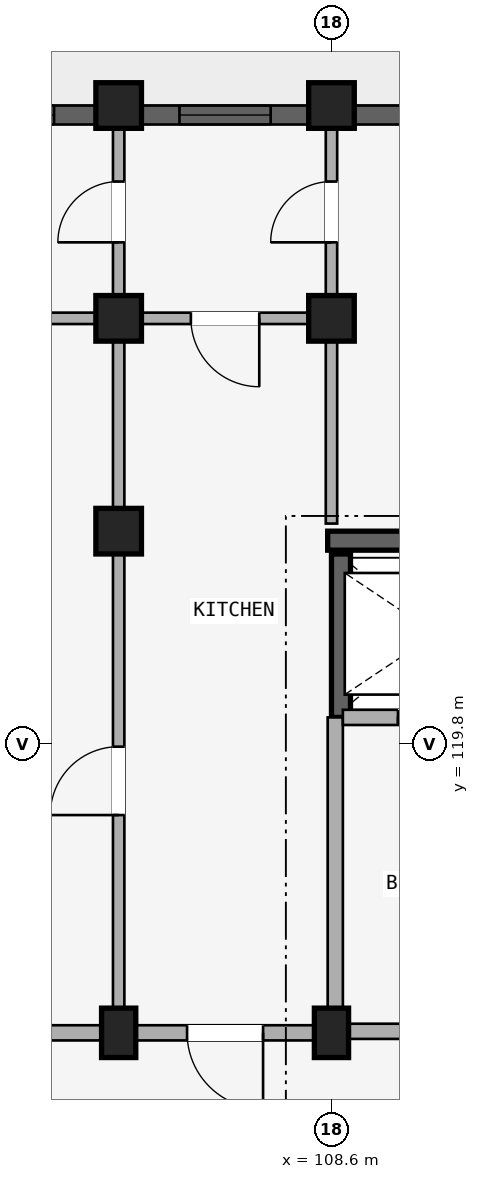
"""IFC4 building model, lengths in metres.
Left out: names, types, materials, properties, quantities, classifications, styles, units other than length and angle.
Written with IfcOpenShell. Run it as: python <this file> out.ifc"""

import sys

from ifc_helpers import new_model, si_unit, direction, frame, frame_2d, origin, origin_2d, place, context, subcontext, project, spatial, rectangle, extrude, element, fill, save


model = new_model("IFC4")
c1 = context("Model", 3, precision=1e-05, world=origin(), true_north=direction((0.0, 1.0)))
c2 = subcontext(c1, "Body", "Model", "MODEL_VIEW")
j1 = project(units=[si_unit("LENGTHUNIT", "METRE"), si_unit("PLANEANGLEUNIT", "RADIAN")], contexts=[c1])
p1 = place(None, origin())
s1 = spatial("IfcSite", under=j1, at=p1, CompositionType="ELEMENT")
p2 = place(p1, origin())
s2 = spatial("IfcBuilding", under=s1, at=p2, CompositionType="ELEMENT")
p3 = place(p2, frame((0.0, 0.0, 33.9)))
s3 = spatial("IfcBuildingStorey", under=s2, at=p3, CompositionType="ELEMENT", Elevation=33.9)
p4 = place(p3, frame((111.35, 122.475, 0.0), z_axis=(0.0, 0.0, 1.0), x_axis=(-1.0, 0.0, 0.0)))
e1 = element("IfcWall", 1, at=p4, inside=s3, PredefinedType="SHEAR", context=c2, shape_type="SweptSolid", body=[
    extrude(rectangle(XDim=2.8, YDim=0.25, at=frame_2d((1.4, 0.0))), origin(), (0.0, 0.0, 1.0), 2.93),
])
p5 = place(p3, frame((108.725, 120.15, 0.0), z_axis=(0.0, 0.0, 1.0), x_axis=(0.0, 1.0, 0.0)))
e2 = element("IfcWall", 2, at=p5, inside=s3, PredefinedType="SHEAR", context=c2, shape_type="SweptSolid", body=[
    extrude(rectangle(XDim=2.15, YDim=0.25, at=frame_2d((1.075, 0.0))), origin(), (0.0, 0.0, 1.0), 2.93),
])
p6 = place(p3, frame((108.6, 116.0, 0.0), z_axis=(0.0, 0.0, 1.0), x_axis=(1.0, 0.0, 0.0)))
e3 = element("IfcColumn", 3, at=p6, inside=s3, PredefinedType="COLUMN", context=c2, shape_type="SweptSolid", body=[
    extrude(rectangle(XDim=0.45, YDim=0.65, at=origin_2d()), origin(), (0.0, 0.0, 1.0), 2.93),
])
p7 = place(p3, frame((108.6, 125.4, 0.0), z_axis=(0.0, 0.0, 1.0), x_axis=(1.0, 0.0, 0.0)))
e4 = element("IfcColumn", 4, at=p7, inside=s3, PredefinedType="COLUMN", context=c2, shape_type="SweptSolid", body=[
    extrude(rectangle(XDim=0.6, YDim=0.6, at=origin_2d()), origin(), (0.0, 0.0, 1.0), 2.93),
])
p8 = place(p3, frame((108.6, 128.2, 0.0), z_axis=(0.0, 0.0, 1.0), x_axis=(1.0, 0.0, 0.0)))
e5 = element("IfcColumn", 5, at=p8, inside=s3, PredefinedType="COLUMN", context=c2, shape_type="SweptSolid", body=[
    extrude(rectangle(XDim=0.6, YDim=0.6, at=origin_2d()), origin(), (0.0, 0.0, 1.0), 2.97),
])
p9 = place(p3, frame((105.8, 116.0, 0.0), z_axis=(0.0, 0.0, 1.0), x_axis=(1.0, 0.0, 0.0)))
e6 = element("IfcColumn", 6, at=p9, inside=s3, PredefinedType="COLUMN", context=c2, shape_type="SweptSolid", body=[
    extrude(rectangle(XDim=0.45, YDim=0.65, at=origin_2d()), origin(), (0.0, 0.0, 1.0), 2.93),
])
for number, where, z_axis, x_axis in (
    (7, (105.8, 122.6, 0.0), (0.0, 0.0, 1.0), (1.0, 0.0, 0.0)),
    (8, (105.8, 125.4, 0.0), (0.0, 0.0, 1.0), (1.0, 0.0, 0.0)),
):
    element("IfcColumn", number, at=place(p3, frame(where, z_axis=z_axis, x_axis=x_axis)), inside=s3, PredefinedType="COLUMN", context=c2, shape_type="SweptSolid", body=[
        extrude(rectangle(XDim=0.6, YDim=0.6, at=origin_2d()), origin(), (0.0, 0.0, 1.0), 2.93),
    ])
p10 = place(p3, frame((105.8, 128.2, 0.0), z_axis=(0.0, 0.0, 1.0), x_axis=(1.0, 0.0, 0.0)))
e9 = element("IfcColumn", 9, at=p10, inside=s3, PredefinedType="COLUMN", context=c2, shape_type="SweptSolid", body=[
    extrude(rectangle(XDim=0.6, YDim=0.6, at=origin_2d()), origin(), (0.0, 0.0, 1.0), 2.97),
])
p11 = place(p3, frame((114.3, 116.02, 0.0), z_axis=(0.0, 0.0, 1.0), x_axis=(-1.0, 0.0, 0.0)))
e10 = element("IfcWall", 10, at=p11, inside=s3, PredefinedType="STANDARD", context=c2, shape_type="SweptSolid", body=[
    extrude(rectangle(XDim=5.65, YDim=0.2, at=frame_2d((2.825, 0.0))), origin(), (0.0, 0.0, 1.0), 2.372),
])
p12 = place(p11, frame((1.923, 0.0, 0.0)))
e11 = element("IfcOpeningElement", 11, at=p12, cuts=e10, PredefinedType="OPENING", context=c2, shape_type="SweptSolid", body=[
    extrude(rectangle(XDim=1.24, YDim=2.15, at=frame_2d((0.62, 1.075))), frame((0.0, 0.11, 0.0), z_axis=(0.0, -1.0, 0.0), x_axis=(1.0, 0.0, 0.0)), (0.0, 0.0, 1.0), 0.22),
])
p13 = place(p3, frame((108.65, 116.02, 0.0), z_axis=(0.0, 0.0, 1.0), x_axis=(0.0, 1.0, 0.0)))
e12 = element("IfcWall", 12, at=p13, inside=s3, PredefinedType="STANDARD", context=c2, shape_type="SweptSolid", body=[
    extrude(rectangle(XDim=4.13, YDim=0.2, at=frame_2d((2.065, 0.0))), origin(), (0.0, 0.0, 1.0), 2.372),
])
p14 = place(p3, frame((111.3, 120.15, 0.0), z_axis=(0.0, 0.0, 1.0), x_axis=(-1.0, 0.0, 0.0)))
e13 = element("IfcWall", 13, at=p14, inside=s3, PredefinedType="STANDARD", context=c2, shape_type="SweptSolid", body=[
    extrude(rectangle(XDim=2.55, YDim=0.2, at=frame_2d((1.275, 0.0))), origin(), (0.0, 0.0, 1.0), 2.372),
])
p15 = place(p14, frame((0.725, 0.0, 0.0)))
e14 = element("IfcOpeningElement", 14, at=p15, cuts=e13, PredefinedType="OPENING", context=c2, shape_type="SweptSolid", body=[
    extrude(rectangle(XDim=1.1, YDim=2.15, at=frame_2d((0.55, 1.075))), frame((0.0, 0.11, 0.0), z_axis=(0.0, -1.0, 0.0), x_axis=(1.0, 0.0, 0.0)), (0.0, 0.0, 1.0), 0.22),
])
p16 = place(p3, frame((108.6, 116.0, 0.0), z_axis=(0.0, 0.0, 1.0), x_axis=(-1.0, 0.0, 0.0)))
e15 = element("IfcWall", 15, at=p16, inside=s3, PredefinedType="STANDARD", context=c2, shape_type="SweptSolid", body=[
    extrude(rectangle(XDim=2.8, YDim=0.2, at=frame_2d((1.4, 0.0))), origin(), (0.0, 0.0, 1.0), 2.372),
])
p17 = place(p16, frame((0.9, 0.0, 0.0)))
e16 = element("IfcOpeningElement", 16, at=p17, cuts=e15, PredefinedType="OPENING", context=c2, shape_type="SweptSolid", body=[
    extrude(rectangle(XDim=1.0, YDim=2.15, at=frame_2d((0.5, 1.075))), frame((0.0, 0.11, 0.0), z_axis=(0.0, -1.0, 0.0), x_axis=(1.0, 0.0, 0.0)), (0.0, 0.0, 1.0), 0.22),
])
p18 = place(p3, frame((108.52, 125.4, 0.0), z_axis=(0.0, 0.0, 1.0), x_axis=(-1.0, 0.0, 0.0)))
e17 = element("IfcWall", 17, at=p18, inside=s3, PredefinedType="PLUMBINGWALL", context=c2, shape_type="SweptSolid", body=[
    extrude(rectangle(XDim=2.64, YDim=0.15, at=frame_2d((1.32, 0.0))), origin(), (0.0, 0.0, 1.0), 2.372),
])
p19 = place(p18, frame((0.87, 0.0, 0.0)))
e18 = element("IfcOpeningElement", 18, at=p19, cuts=e17, PredefinedType="OPENING", context=c2, shape_type="SweptSolid", body=[
    extrude(rectangle(XDim=0.9, YDim=2.1, at=frame_2d((0.45, 1.05))), frame((0.0, 0.085, 0.0), z_axis=(0.0, -1.0, 0.0), x_axis=(1.0, 0.0, 0.0)), (0.0, 0.0, 1.0), 0.17),
])
p20 = place(p3, frame((105.8, 116.0, 0.0), z_axis=(0.0, 0.0, 1.0), x_axis=(-1.0, 0.0, 0.0)))
e19 = element("IfcWall", 19, at=p20, inside=s3, PredefinedType="STANDARD", context=c2, shape_type="SweptSolid", body=[
    extrude(rectangle(XDim=2.8, YDim=0.2, at=frame_2d((1.4, 0.0))), origin(), (0.0, 0.0, 1.0), 2.372),
])
p21 = place(p3, frame((105.72, 125.4, 0.0), z_axis=(0.0, 0.0, 1.0), x_axis=(-1.0, 0.0, 0.0)))
e20 = element("IfcWall", 20, at=p21, inside=s3, PredefinedType="PLUMBINGWALL", context=c2, shape_type="SweptSolid", body=[
    extrude(rectangle(XDim=2.64, YDim=0.15, at=frame_2d((1.32, 0.0))), origin(), (0.0, 0.0, 1.0), 2.372),
])
p22 = place(p21, frame((0.92, 0.0, 0.0)))
e21 = element("IfcOpeningElement", 21, at=p22, cuts=e20, PredefinedType="OPENING", context=c2, shape_type="SweptSolid", body=[
    extrude(rectangle(XDim=0.8, YDim=2.1, at=frame_2d((0.4, 1.05))), frame((0.0, 0.085, 0.0), z_axis=(0.0, -1.0, 0.0), x_axis=(1.0, 0.0, 0.0)), (0.0, 0.0, 1.0), 0.17),
])
p23 = place(p3, frame((108.6, 122.7, 0.0), z_axis=(0.0, 0.0, 1.0), x_axis=(0.0, 1.0, 0.0)))
e22 = element("IfcWall", 22, at=p23, inside=s3, PredefinedType="PARTITIONING", context=c2, shape_type="SweptSolid", body=[
    extrude(rectangle(XDim=5.22, YDim=0.15, at=frame_2d((2.61, 0.0))), origin(), (0.0, 0.0, 1.0), 2.372),
])
p24 = place(p23, frame((3.7, 0.0, 0.0)))
e23 = element("IfcOpeningElement", 23, at=p24, cuts=e22, PredefinedType="OPENING", context=c2, shape_type="SweptSolid", body=[
    extrude(rectangle(XDim=0.8, YDim=2.1, at=frame_2d((0.4, 1.05))), frame((0.0, 0.085, 0.0), z_axis=(0.0, -1.0, 0.0), x_axis=(1.0, 0.0, 0.0)), (0.0, 0.0, 1.0), 0.17),
])
p25 = place(p3, frame((105.8, 116.05, 0.0), z_axis=(0.0, 0.0, 1.0), x_axis=(0.0, 1.0, 0.0)))
e24 = element("IfcWall", 24, at=p25, inside=s3, PredefinedType="PARTITIONING", context=c2, shape_type="SweptSolid", body=[
    extrude(rectangle(XDim=6.53, YDim=0.15, at=frame_2d((3.265, 0.0))), origin(), (0.0, 0.0, 1.0), 2.372),
])
p26 = place(p25, frame((2.815, 0.0, 0.0)))
e25 = element("IfcOpeningElement", 25, at=p26, cuts=e24, PredefinedType="OPENING", context=c2, shape_type="SweptSolid", body=[
    extrude(rectangle(XDim=0.9, YDim=2.1, at=frame_2d((0.45, 1.05))), frame((0.0, 0.085, 0.0), z_axis=(0.0, -1.0, 0.0), x_axis=(1.0, 0.0, 0.0)), (0.0, 0.0, 1.0), 0.17),
])
p27 = place(p3, frame((105.8, 122.7, 0.0), z_axis=(0.0, 0.0, 1.0), x_axis=(0.0, 1.0, 0.0)))
e26 = element("IfcWall", 26, at=p27, inside=s3, PredefinedType="PARTITIONING", context=c2, shape_type="SweptSolid", body=[
    extrude(rectangle(XDim=5.22, YDim=0.15, at=frame_2d((2.61, 0.0))), origin(), (0.0, 0.0, 1.0), 2.372),
])
p28 = place(p27, frame((3.7, 0.0, 0.0)))
e27 = element("IfcOpeningElement", 27, at=p28, cuts=e26, PredefinedType="OPENING", context=c2, shape_type="SweptSolid", body=[
    extrude(rectangle(XDim=0.8, YDim=2.1, at=frame_2d((0.4, 1.05))), frame((0.0, 0.085, 0.0), z_axis=(0.0, -1.0, 0.0), x_axis=(1.0, 0.0, 0.0)), (0.0, 0.0, 1.0), 0.17),
])
p29 = place(p3, frame((113.896, 128.075, 0.0), z_axis=(0.0, 0.0, 1.0), x_axis=(-1.0, 0.0, 0.0)))
e28 = element("IfcWall", 28, at=p29, inside=s3, PredefinedType="STANDARD", context=c2, shape_type="SweptSolid", body=[
    extrude(rectangle(XDim=4.993, YDim=0.25, at=frame_2d((2.497, 0.0))), origin(), (0.0, 0.0, 1.0), 2.48),
])
p30 = place(p29, frame((1.822, 0.0, 0.68)))
e29 = element("IfcOpeningElement", 29, at=p30, cuts=e28, PredefinedType="OPENING", context=c2, shape_type="SweptSolid", body=[
    extrude(rectangle(XDim=1.35, YDim=1.6, at=frame_2d((0.675, 0.8))), frame((0.0, 0.135, 0.0), z_axis=(0.0, -1.0, 0.0), x_axis=(1.0, 0.0, 0.0)), (0.0, 0.0, 1.0), 0.27),
])
p31 = place(p3, frame((108.296, 128.075, 0.0), z_axis=(0.0, 0.0, 1.0), x_axis=(-1.0, 0.0, 0.0)))
e30 = element("IfcWall", 30, at=p31, inside=s3, PredefinedType="STANDARD", context=c2, shape_type="SweptSolid", body=[
    extrude(rectangle(XDim=2.193, YDim=0.25, at=frame_2d((1.096, 0.0))), origin(), (0.0, 0.0, 1.0), 2.48),
])
p32 = place(p31, frame((0.497, 0.0, 0.78)))
e31 = element("IfcOpeningElement", 31, at=p32, cuts=e30, PredefinedType="OPENING", context=c2, shape_type="SweptSolid", body=[
    extrude(rectangle(XDim=1.2, YDim=1.5, at=frame_2d((0.6, 0.75))), frame((0.0, 0.135, 0.0), z_axis=(0.0, -1.0, 0.0), x_axis=(1.0, 0.0, 0.0)), (0.0, 0.0, 1.0), 0.27),
])
p33 = place(p3, frame((105.497, 128.075, 0.0), z_axis=(0.0, 0.0, 1.0), x_axis=(-1.0, 0.0, 0.0)))
e32 = element("IfcWall", 32, at=p33, inside=s3, PredefinedType="STANDARD", context=c2, shape_type="SweptSolid", body=[
    extrude(rectangle(XDim=2.193, YDim=0.25, at=frame_2d((1.097, 0.0))), origin(), (0.0, 0.0, 1.0), 2.48),
])
p34 = place(p33, frame((0.546, 0.0, 0.83)))
e33 = element("IfcOpeningElement", 33, at=p34, cuts=e32, PredefinedType="OPENING", context=c2, shape_type="SweptSolid", body=[
    extrude(rectangle(XDim=1.1, YDim=1.45, at=frame_2d((0.55, 0.725))), frame((0.0, 0.135, 0.0), z_axis=(0.0, -1.0, 0.0), x_axis=(1.0, 0.0, 0.0)), (0.0, 0.0, 1.0), 0.27),
])
p35 = place(p32, origin())
e34 = element("IfcWindow", 34, at=p35, inside=s3, PartitioningType="SINGLE_PANEL", PredefinedType="WINDOW", context=c2, shape_type="SweptSolid", body=[
    extrude(rectangle(XDim=1.2, YDim=1.5, at=frame_2d((0.6, 0.75))), frame((0.0, 0.03, 0.0), z_axis=(0.0, -1.0, 0.0), x_axis=(1.0, 0.0, 0.0)), (0.0, 0.0, 1.0), 0.06),
])
fill(e31, e34)
p36 = place(p34, origin())
e35 = element("IfcWindow", 35, at=p36, inside=s3, PartitioningType="SINGLE_PANEL", PredefinedType="WINDOW", context=c2, shape_type="SweptSolid", body=[
    extrude(rectangle(XDim=1.1, YDim=1.45, at=frame_2d((0.55, 0.725))), frame((0.0, 0.03, 0.0), z_axis=(0.0, -1.0, 0.0), x_axis=(1.0, 0.0, 0.0)), (0.0, 0.0, 1.0), 0.06),
])
fill(e33, e35)
p37 = place(p15, origin())
e36 = element("IfcDoor", 36, at=p37, inside=s3, OperationType="SLIDING_TO_LEFT", PredefinedType="DOOR", context=c2, shape_type="SweptSolid", body=[
    extrude(rectangle(XDim=1.1, YDim=2.15, at=frame_2d((0.55, 1.075))), frame((0.0, 0.025, 0.0), z_axis=(0.0, -1.0, 0.0), x_axis=(1.0, 0.0, 0.0)), (0.0, 0.0, 1.0), 0.05),
])
fill(e14, e36)
p38 = place(p19, frame((0.9, 0.0, 0.0), z_axis=(0.0, 0.0, 1.0), x_axis=(-1.0, 0.0, 0.0)))
e37 = element("IfcDoor", 37, at=p38, inside=s3, OperationType="SINGLE_SWING_RIGHT", PredefinedType="DOOR", context=c2, shape_type="SweptSolid", body=[
    extrude(rectangle(XDim=0.9, YDim=2.1, at=frame_2d((0.45, 1.05))), frame((0.0, 0.025, 0.0), z_axis=(0.0, -1.0, 0.0), x_axis=(1.0, 0.0, 0.0)), (0.0, 0.0, 1.0), 0.05),
])
fill(e18, e37)
p39 = place(p17, origin())
e38 = element("IfcDoor", 38, at=p39, inside=s3, OperationType="SINGLE_SWING_LEFT", PredefinedType="DOOR", context=c2, shape_type="SweptSolid", body=[
    extrude(rectangle(XDim=1.0, YDim=2.15, at=frame_2d((0.5, 1.075))), frame((0.0, 0.025, 0.0), z_axis=(0.0, -1.0, 0.0), x_axis=(1.0, 0.0, 0.0)), (0.0, 0.0, 1.0), 0.05),
])
fill(e16, e38)
p40 = place(p24, origin())
e39 = element("IfcDoor", 39, at=p40, inside=s3, OperationType="SINGLE_SWING_LEFT", PredefinedType="DOOR", context=c2, shape_type="SweptSolid", body=[
    extrude(rectangle(XDim=0.8, YDim=2.1, at=frame_2d((0.4, 1.05))), frame((0.0, 0.025, 0.0), z_axis=(0.0, -1.0, 0.0), x_axis=(1.0, 0.0, 0.0)), (0.0, 0.0, 1.0), 0.05),
])
fill(e23, e39)
p41 = place(p26, origin())
e40 = element("IfcDoor", 40, at=p41, inside=s3, OperationType="SINGLE_SWING_LEFT", PredefinedType="DOOR", context=c2, shape_type="SweptSolid", body=[
    extrude(rectangle(XDim=0.9, YDim=2.1, at=frame_2d((0.45, 1.05))), frame((0.0, 0.025, 0.0), z_axis=(0.0, -1.0, 0.0), x_axis=(1.0, 0.0, 0.0)), (0.0, 0.0, 1.0), 0.05),
])
fill(e25, e40)
p42 = place(p28, frame((0.8, 0.0, 0.0), z_axis=(0.0, 0.0, 1.0), x_axis=(-1.0, 0.0, 0.0)))
e41 = element("IfcDoor", 41, at=p42, inside=s3, OperationType="SINGLE_SWING_RIGHT", PredefinedType="DOOR", context=c2, shape_type="SweptSolid", body=[
    extrude(rectangle(XDim=0.8, YDim=2.1, at=frame_2d((0.4, 1.05))), frame((0.0, 0.025, 0.0), z_axis=(0.0, -1.0, 0.0), x_axis=(1.0, 0.0, 0.0)), (0.0, 0.0, 1.0), 0.05),
])
fill(e27, e41)
save(model, sys.argv[1])
